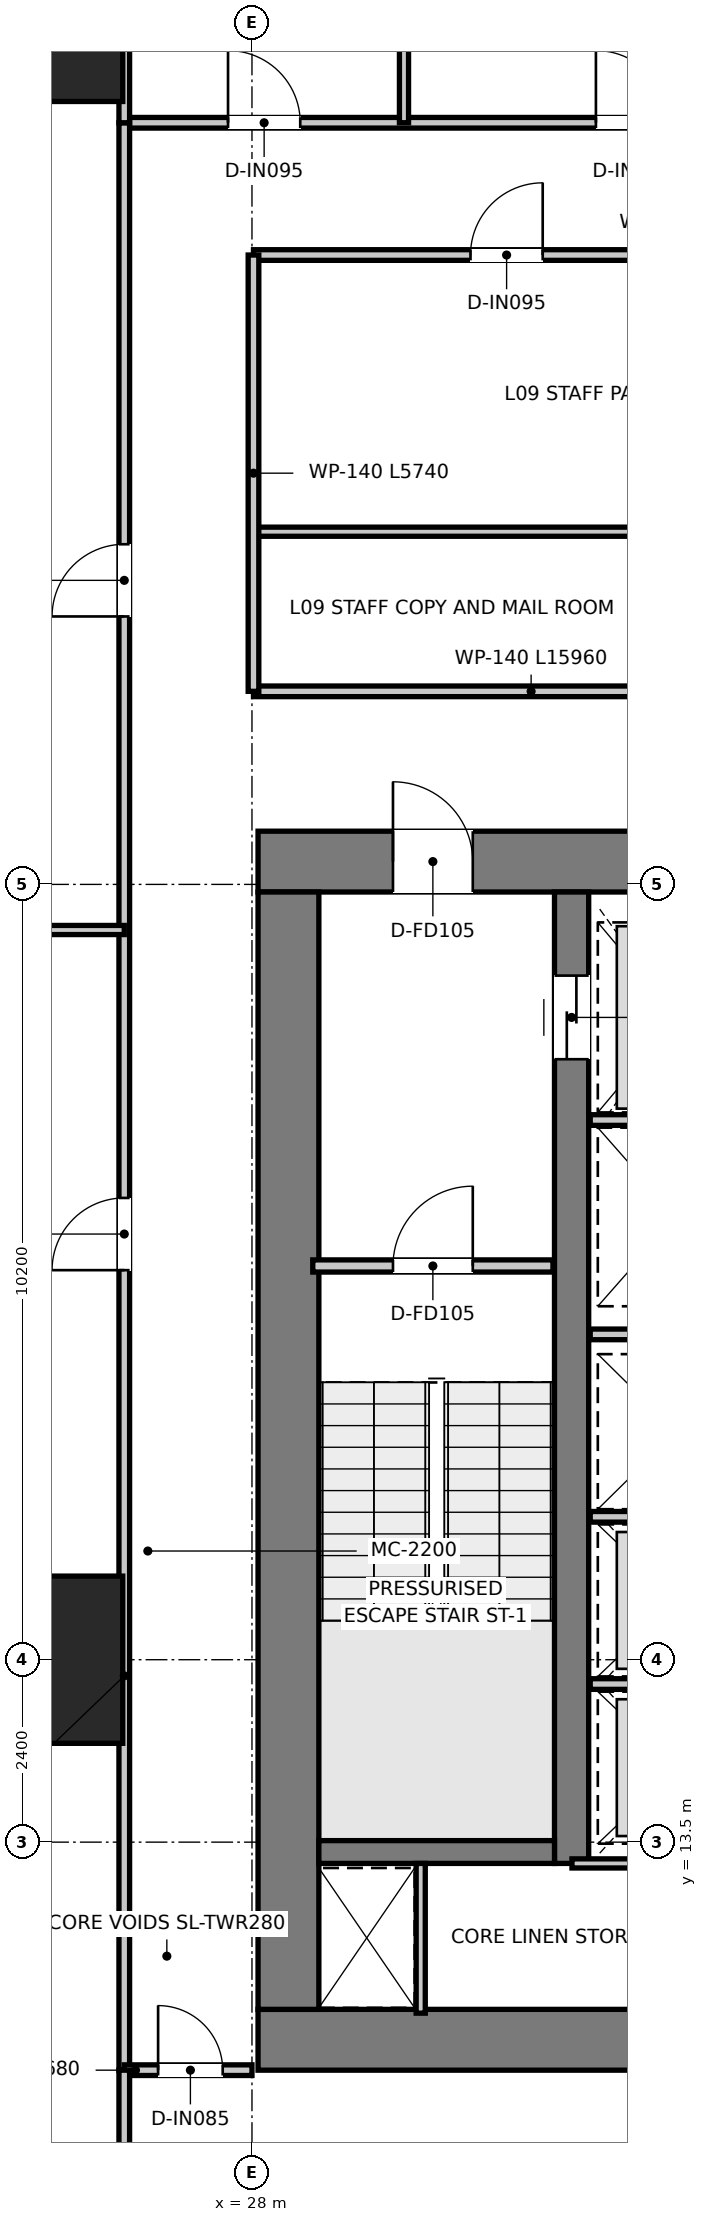
"""IFC4 building model, lengths in metres.
Left out: names, types, materials, properties, quantities, classifications, styles, units other than length and angle.
Written with IfcOpenShell. Run it as: python <this file> out.ifc"""

import sys

from ifc_helpers import new_model, si_unit, direction, frame, frame_2d, origin, origin_2d, place, context, subcontext, project, spatial, rectangle, extrude, source, transform, mapped, element, fill, save


model = new_model("IFC4")
c1 = context("Model", 3, precision=1e-05, world=origin(), true_north=direction((0.0, 1.0)))
c2 = subcontext(c1, "Body", "Model", "MODEL_VIEW")
j1 = project(units=[si_unit("LENGTHUNIT", "METRE"), si_unit("PLANEANGLEUNIT", "RADIAN")], contexts=[c1])
p1 = place(None, origin())
s1 = spatial("IfcSite", under=j1, at=p1, CompositionType="ELEMENT")
p2 = place(p1, origin())
s2 = spatial("IfcBuilding", under=s1, at=p2, CompositionType="ELEMENT")
p3 = place(p2, frame((0.0, 0.0, 40.8)))
s3 = spatial("IfcBuildingStorey", under=s2, at=p3, CompositionType="ELEMENT", Elevation=40.8)
p4 = place(p3, frame((28.08, 10.9, 0.0), z_axis=(0.0, 0.0, 1.0), x_axis=(1.0, 0.0, 0.0)))
e1 = element("IfcWall", 1, at=p4, inside=s3, PredefinedType="SHEAR", context=c2, shape_type="SweptSolid", body=[
    extrude(rectangle(XDim=15.84, YDim=0.8, at=frame_2d((7.92, 0.0))), origin(), (0.0, 0.0, 1.0), 3.95),
])
p5 = place(p3, frame((28.08, 26.4, 0.0), z_axis=(0.0, 0.0, 1.0), x_axis=(1.0, 0.0, 0.0)))
e2 = element("IfcWall", 2, at=p5, inside=s3, PredefinedType="SHEAR", context=c2, shape_type="SweptSolid", body=[
    extrude(rectangle(XDim=15.84, YDim=0.8, at=frame_2d((7.92, 0.0))), origin(), (0.0, 0.0, 1.0), 3.95),
])
p6 = place(p5, frame((7.22, 0.0, 0.0)))
e3 = element("IfcOpeningElement", 3, at=p6, cuts=e2, PredefinedType="OPENING", context=c2, shape_type="SweptSolid", body=[
    extrude(rectangle(XDim=1.4, YDim=2.2, at=frame_2d((0.7, 1.1))), frame((0.0, 0.41, 0.0), z_axis=(0.0, -1.0, 0.0), x_axis=(1.0, 0.0, 0.0)), (0.0, 0.0, 1.0), 0.82),
])
p7 = place(p5, frame((1.775, 0.0, 0.0)))
e4 = element("IfcOpeningElement", 4, at=p7, cuts=e2, PredefinedType="OPENING", context=c2, shape_type="SweptSolid", body=[
    extrude(rectangle(XDim=1.05, YDim=2.1, at=frame_2d((0.525, 1.05))), frame((0.0, 0.41, 0.0), z_axis=(0.0, -1.0, 0.0), x_axis=(1.0, 0.0, 0.0)), (0.0, 0.0, 1.0), 0.82),
])
p8 = place(p5, frame((13.015, 0.0, 0.0)))
e5 = element("IfcOpeningElement", 5, at=p8, cuts=e2, PredefinedType="OPENING", context=c2, shape_type="SweptSolid", body=[
    extrude(rectangle(XDim=1.05, YDim=2.1, at=frame_2d((0.525, 1.05))), frame((0.0, 0.41, 0.0), z_axis=(0.0, -1.0, 0.0), x_axis=(1.0, 0.0, 0.0)), (0.0, 0.0, 1.0), 0.82),
])
p9 = place(p3, frame((28.48, 11.3, 0.0), z_axis=(0.0, 0.0, 1.0), x_axis=(0.0, 1.0, 0.0)))
e6 = element("IfcWall", 6, at=p9, inside=s3, PredefinedType="SHEAR", context=c2, shape_type="SweptSolid", body=[
    extrude(rectangle(XDim=14.7, YDim=0.8, at=frame_2d((7.35, 0.0))), origin(), (0.0, 0.0, 1.0), 3.95),
])
p10 = place(p3, frame((32.205, 13.22, 0.0), z_axis=(0.0, 0.0, 1.0), x_axis=(0.0, 1.0, 0.0)))
e7 = element("IfcWall", 7, at=p10, inside=s3, PredefinedType="SHEAR", context=c2, shape_type="SweptSolid", body=[
    extrude(rectangle(XDim=12.78, YDim=0.45, at=frame_2d((6.39, 0.0))), origin(), (0.0, 0.0, 1.0), 3.95),
])
p11 = place(p10, frame((10.58, 0.0, 0.0)))
e8 = element("IfcOpeningElement", 8, at=p11, cuts=e7, PredefinedType="OPENING", context=c2, shape_type="SweptSolid", body=[
    extrude(rectangle(XDim=1.1, YDim=2.15, at=frame_2d((0.55, 1.075))), frame((0.0, 0.235, 0.0), z_axis=(0.0, -1.0, 0.0), x_axis=(1.0, 0.0, 0.0)), (0.0, 0.0, 1.0), 0.47),
])
p12 = place(p3, frame((28.88, 13.37, 0.0), z_axis=(0.0, 0.0, 1.0), x_axis=(1.0, 0.0, 0.0)))
e9 = element("IfcWall", 9, at=p12, inside=s3, PredefinedType="SHEAR", context=c2, shape_type="SweptSolid", body=[
    extrude(rectangle(XDim=3.1, YDim=0.3, at=frame_2d((1.55, 0.0))), origin(), (0.0, 0.0, 1.0), 3.95),
])
m1 = source(origin(), c2, "Body", "SweptSolid", [
    extrude(rectangle(XDim=2.2, YDim=2.2, at=origin_2d()), origin(), (0.0, 0.0, 1.0), 3.95),
])
for number, where, z_axis, x_axis in (
    (10, (25.2, 15.9, 0.0), (0.0, 0.0, 1.0), (1.0, 0.0, 0.0)),
    (11, (25.2, 37.5, 0.0), (0.0, 0.0, 1.0), (1.0, 0.0, 0.0)),
):
    element("IfcColumn", number, at=place(p3, frame(where, z_axis=z_axis, x_axis=x_axis)), inside=s3, PredefinedType="USERDEFINED", context=c2, shape_type="MappedRepresentation", body=[
        mapped(m1, transform((0.0, 0.0, 0.0), x_axis=(1.0, 0.0, 0.0), y_axis=(0.0, 1.0, 0.0), z_axis=(0.0, 0.0, 1.0), scale=1.0)),
    ])
p13 = place(p3, frame((28.8, 21.08, 0.0), z_axis=(0.0, 0.0, 1.0), x_axis=(1.0, 0.0, 0.0)))
e12 = element("IfcWall", 12, at=p13, inside=s3, PredefinedType="PARTITIONING", context=c2, shape_type="SweptSolid", body=[
    extrude(rectangle(XDim=3.16, YDim=0.16, at=frame_2d((1.58, 0.0))), origin(), (0.0, 0.0, 1.0), 3.67),
])
p14 = place(p13, frame((1.055, 0.0, 0.0)))
e13 = element("IfcOpeningElement", 13, at=p14, cuts=e12, PredefinedType="OPENING", context=c2, shape_type="SweptSolid", body=[
    extrude(rectangle(XDim=1.05, YDim=2.1, at=frame_2d((0.525, 1.05))), frame((0.0, 0.09, 0.0), z_axis=(0.0, -1.0, 0.0), x_axis=(1.0, 0.0, 0.0)), (0.0, 0.0, 1.0), 0.18),
])
p15 = place(p3, frame((32.45, 23.0, 0.0), z_axis=(0.0, 0.0, 1.0), x_axis=(1.0, 0.0, 0.0)))
e14 = element("IfcWall", 14, at=p15, inside=s3, PredefinedType="PARTITIONING", context=c2, shape_type="SweptSolid", body=[
    extrude(rectangle(XDim=2.27, YDim=0.14, at=frame_2d((1.135, 0.0))), origin(), (0.0, 0.0, 1.0), 2.47),
])
for number, where, z_axis, x_axis in (
    (15, (32.45, 17.78, 0.0), (0.0, 0.0, 1.0), (1.0, 0.0, 0.0)),
    (16, (32.45, 20.18, 0.0), (0.0, 0.0, 1.0), (1.0, 0.0, 0.0)),
    (17, (32.45, 15.58, 0.0), (0.0, 0.0, 1.0), (1.0, 0.0, 0.0)),
):
    element("IfcWall", number, at=place(p3, frame(where, z_axis=z_axis, x_axis=x_axis)), inside=s3, PredefinedType="PARTITIONING", context=c2, shape_type="SweptSolid", body=[
        extrude(rectangle(XDim=2.27, YDim=0.14, at=frame_2d((1.135, 0.0))), origin(), (0.0, 0.0, 1.0), 3.67),
    ])
p16 = place(p3, frame((30.22, 11.25, 0.0), z_axis=(0.0, 0.0, 1.0), x_axis=(0.0, 1.0, 0.0)))
e18 = element("IfcWall", 18, at=p16, inside=s3, PredefinedType="PARTITIONING", context=c2, shape_type="SweptSolid", body=[
    extrude(rectangle(XDim=1.97, YDim=0.12, at=frame_2d((0.985, 0.0))), origin(), (0.0, 0.0, 1.0), 3.67),
])
p17 = place(p3, frame((32.21, 13.22, 0.0), z_axis=(0.0, 0.0, 1.0), x_axis=(1.0, 0.0, 0.0)))
e19 = element("IfcWall", 19, at=p17, inside=s3, PredefinedType="PARTITIONING", context=c2, shape_type="SweptSolid", body=[
    extrude(rectangle(XDim=7.58, YDim=0.12, at=frame_2d((3.79, 0.0))), origin(), (0.0, 0.0, 1.0), 3.67),
])
p18 = place(p17, frame((3.365, 0.0, 0.0)))
e20 = element("IfcOpeningElement", 20, at=p18, cuts=e19, PredefinedType="OPENING", context=c2, shape_type="SweptSolid", body=[
    extrude(rectangle(XDim=0.85, YDim=2.1, at=frame_2d((0.425, 1.05))), frame((0.0, 0.07, 0.0), z_axis=(0.0, -1.0, 0.0), x_axis=(1.0, 0.0, 0.0)), (0.0, 0.0, 1.0), 0.14),
])
p19 = place(p3, frame((28.02, 28.64, 0.0), z_axis=(0.0, 0.0, 1.0), x_axis=(1.0, 0.0, 0.0)))
e21 = element("IfcWall", 21, at=p19, inside=s3, PredefinedType="PARTITIONING", context=c2, shape_type="SweptSolid", body=[
    extrude(rectangle(XDim=15.96, YDim=0.14, at=frame_2d((7.98, 0.0))), origin(), (0.0, 0.0, 1.0), 3.08),
])
p20 = place(p19, frame((7.455, 0.0, 0.0)))
e22 = element("IfcOpeningElement", 22, at=p20, cuts=e21, PredefinedType="OPENING", context=c2, shape_type="SweptSolid", body=[
    extrude(rectangle(XDim=1.05, YDim=2.15, at=frame_2d((0.525, 1.075))), frame((0.0, 0.08, 0.0), z_axis=(0.0, -1.0, 0.0), x_axis=(1.0, 0.0, 0.0)), (0.0, 0.0, 1.0), 0.16),
])
p21 = place(p3, frame((28.02, 30.74, 0.0), z_axis=(0.0, 0.0, 1.0), x_axis=(1.0, 0.0, 0.0)))
e23 = element("IfcWall", 23, at=p21, inside=s3, PredefinedType="PARTITIONING", context=c2, shape_type="SweptSolid", body=[
    extrude(rectangle(XDim=15.96, YDim=0.12, at=frame_2d((7.98, 0.0))), origin(), (0.0, 0.0, 1.0), 3.08),
])
p22 = place(p3, frame((28.02, 34.38, 0.0), z_axis=(0.0, 0.0, 1.0), x_axis=(1.0, 0.0, 0.0)))
e24 = element("IfcWall", 24, at=p22, inside=s3, PredefinedType="PARTITIONING", context=c2, shape_type="SweptSolid", body=[
    extrude(rectangle(XDim=15.96, YDim=0.14, at=frame_2d((7.98, 0.0))), origin(), (0.0, 0.0, 1.0), 3.08),
])
p23 = place(p22, frame((7.83, 0.0, 0.0)))
e25 = element("IfcOpeningElement", 25, at=p23, cuts=e24, PredefinedType="OPENING", context=c2, shape_type="SweptSolid", body=[
    extrude(rectangle(XDim=0.9, YDim=2.1, at=frame_2d((0.45, 1.05))), frame((0.0, 0.08, 0.0), z_axis=(0.0, -1.0, 0.0), x_axis=(1.0, 0.0, 0.0)), (0.0, 0.0, 1.0), 0.16),
])
p24 = place(p22, frame((11.03, 0.0, 0.0)))
e26 = element("IfcOpeningElement", 26, at=p24, cuts=e24, PredefinedType="OPENING", context=c2, shape_type="SweptSolid", body=[
    extrude(rectangle(XDim=0.9, YDim=2.1, at=frame_2d((0.45, 1.05))), frame((0.0, 0.08, 0.0), z_axis=(0.0, -1.0, 0.0), x_axis=(1.0, 0.0, 0.0)), (0.0, 0.0, 1.0), 0.16),
])
p25 = place(p22, frame((14.055, 0.0, 0.0)))
e27 = element("IfcOpeningElement", 27, at=p25, cuts=e24, PredefinedType="OPENING", context=c2, shape_type="SweptSolid", body=[
    extrude(rectangle(XDim=0.95, YDim=2.1, at=frame_2d((0.475, 1.05))), frame((0.0, 0.08, 0.0), z_axis=(0.0, -1.0, 0.0), x_axis=(1.0, 0.0, 0.0)), (0.0, 0.0, 1.0), 0.16),
])
p26 = place(p22, frame((2.855, 0.0, 0.0)))
e28 = element("IfcOpeningElement", 28, at=p26, cuts=e24, PredefinedType="OPENING", context=c2, shape_type="SweptSolid", body=[
    extrude(rectangle(XDim=0.95, YDim=2.1, at=frame_2d((0.475, 1.05))), frame((0.0, 0.08, 0.0), z_axis=(0.0, -1.0, 0.0), x_axis=(1.0, 0.0, 0.0)), (0.0, 0.0, 1.0), 0.16),
])
p27 = place(p3, frame((28.02, 28.64, 0.0), z_axis=(0.0, 0.0, 1.0), x_axis=(0.0, 1.0, 0.0)))
e29 = element("IfcWall", 29, at=p27, inside=s3, PredefinedType="PARTITIONING", context=c2, shape_type="SweptSolid", body=[
    extrude(rectangle(XDim=5.74, YDim=0.14, at=frame_2d((2.87, 0.0))), origin(), (0.0, 0.0, 1.0), 3.22),
])
p28 = place(p3, frame((26.32, 36.12, 0.0), z_axis=(0.0, 0.0, 1.0), x_axis=(1.0, 0.0, 0.0)))
e30 = element("IfcWall", 30, at=p28, inside=s3, PredefinedType="PARTITIONING", context=c2, shape_type="SweptSolid", body=[
    extrude(rectangle(XDim=19.36, YDim=0.14, at=frame_2d((9.68, 0.0))), origin(), (0.0, 0.0, 1.0), 3.08),
])
p29 = place(p28, frame((1.365, 0.0, 0.0)))
e31 = element("IfcOpeningElement", 31, at=p29, cuts=e30, PredefinedType="OPENING", context=c2, shape_type="SweptSolid", body=[
    extrude(rectangle(XDim=0.95, YDim=2.1, at=frame_2d((0.475, 1.05))), frame((0.0, 0.08, 0.0), z_axis=(0.0, -1.0, 0.0), x_axis=(1.0, 0.0, 0.0)), (0.0, 0.0, 1.0), 0.16),
])
p30 = place(p28, frame((6.205, 0.0, 0.0)))
e32 = element("IfcOpeningElement", 32, at=p30, cuts=e30, PredefinedType="OPENING", context=c2, shape_type="SweptSolid", body=[
    extrude(rectangle(XDim=0.95, YDim=2.1, at=frame_2d((0.475, 1.05))), frame((0.0, 0.08, 0.0), z_axis=(0.0, -1.0, 0.0), x_axis=(1.0, 0.0, 0.0)), (0.0, 0.0, 1.0), 0.16),
])
p31 = place(p28, frame((12.205, 0.0, 0.0)))
e33 = element("IfcOpeningElement", 33, at=p31, cuts=e30, PredefinedType="OPENING", context=c2, shape_type="SweptSolid", body=[
    extrude(rectangle(XDim=0.95, YDim=2.1, at=frame_2d((0.475, 1.05))), frame((0.0, 0.08, 0.0), z_axis=(0.0, -1.0, 0.0), x_axis=(1.0, 0.0, 0.0)), (0.0, 0.0, 1.0), 0.16),
])
p32 = place(p28, frame((17.045, 0.0, 0.0)))
e34 = element("IfcOpeningElement", 34, at=p32, cuts=e30, PredefinedType="OPENING", context=c2, shape_type="SweptSolid", body=[
    extrude(rectangle(XDim=0.95, YDim=2.1, at=frame_2d((0.475, 1.05))), frame((0.0, 0.08, 0.0), z_axis=(0.0, -1.0, 0.0), x_axis=(1.0, 0.0, 0.0)), (0.0, 0.0, 1.0), 0.16),
])
p33 = place(p3, frame((26.32, 10.5, 0.0), z_axis=(0.0, 0.0, 1.0), x_axis=(0.0, 1.0, 0.0)))
e35 = element("IfcWall", 35, at=p33, inside=s3, PredefinedType="PARTITIONING", context=c2, shape_type="SweptSolid", body=[
    extrude(rectangle(XDim=25.62, YDim=0.14, at=frame_2d((12.81, 0.0))), origin(), (0.0, 0.0, 1.0), 2.97),
])
p34 = place(p33, frame((10.525, 0.0, 0.0)))
e36 = element("IfcOpeningElement", 36, at=p34, cuts=e35, PredefinedType="OPENING", context=c2, shape_type="SweptSolid", body=[
    extrude(rectangle(XDim=0.95, YDim=2.1, at=frame_2d((0.475, 1.05))), frame((0.0, 0.08, 0.0), z_axis=(0.0, -1.0, 0.0), x_axis=(1.0, 0.0, 0.0)), (0.0, 0.0, 1.0), 0.16),
])
p35 = place(p33, frame((19.125, 0.0, 0.0)))
e37 = element("IfcOpeningElement", 37, at=p35, cuts=e35, PredefinedType="OPENING", context=c2, shape_type="SweptSolid", body=[
    extrude(rectangle(XDim=0.95, YDim=2.1, at=frame_2d((0.475, 1.05))), frame((0.0, 0.08, 0.0), z_axis=(0.0, -1.0, 0.0), x_axis=(1.0, 0.0, 0.0)), (0.0, 0.0, 1.0), 0.16),
])
p36 = place(p3, frame((26.32, 10.5, 0.0), z_axis=(0.0, 0.0, 1.0), x_axis=(1.0, 0.0, 0.0)))
e38 = element("IfcWall", 38, at=p36, inside=s3, PredefinedType="PARTITIONING", context=c2, shape_type="SweptSolid", body=[
    extrude(rectangle(XDim=1.68, YDim=0.14, at=frame_2d((0.84, 0.0))), origin(), (0.0, 0.0, 1.0), 3.67),
])
p37 = place(p36, frame((0.445, 0.0, 0.0)))
e39 = element("IfcOpeningElement", 39, at=p37, cuts=e38, PredefinedType="OPENING", context=c2, shape_type="SweptSolid", body=[
    extrude(rectangle(XDim=0.85, YDim=2.1, at=frame_2d((0.425, 1.05))), frame((0.0, 0.08, 0.0), z_axis=(0.0, -1.0, 0.0), x_axis=(1.0, 0.0, 0.0)), (0.0, 0.0, 1.0), 0.16),
])
p38 = place(p3, frame((26.32, 36.12, 0.0), z_axis=(0.0, 0.0, 1.0), x_axis=(0.0, 1.0, 0.0)))
e40 = element("IfcWall", 40, at=p38, inside=s3, PredefinedType="PARTITIONING", context=c2, shape_type="SweptSolid", body=[
    extrude(rectangle(XDim=15.866, YDim=0.14, at=frame_2d((7.933, 0.0))), origin(), (0.0, 0.0, 1.0), 2.97),
])
p39 = place(p3, frame((26.32, 2.132, 0.0), z_axis=(0.0, 0.0, 1.0), x_axis=(0.0, 1.0, 0.0)))
e41 = element("IfcWall", 41, at=p39, inside=s3, PredefinedType="PARTITIONING", context=c2, shape_type="SweptSolid", body=[
    extrude(rectangle(XDim=8.368, YDim=0.14, at=frame_2d((4.184, 0.0))), origin(), (0.0, 0.0, 1.0), 3.67),
])
p40 = place(p3, frame((30.0, 36.12, 0.0), z_axis=(0.0, 0.0, 1.0), x_axis=(0.0, 1.0, 0.0)))
e42 = element("IfcWall", 42, at=p40, inside=s3, PredefinedType="PARTITIONING", context=c2, shape_type="SweptSolid", body=[
    extrude(rectangle(XDim=15.73, YDim=0.12, at=frame_2d((7.865, 0.0))), origin(), (0.0, 0.0, 1.0), 2.97),
])
p41 = place(p3, frame((11.028, 25.5, 0.0), z_axis=(0.0, 0.0, 1.0), x_axis=(1.0, 0.0, 0.0)))
e43 = element("IfcWall", 43, at=p41, inside=s3, PredefinedType="PARTITIONING", context=c2, shape_type="SweptSolid", body=[
    extrude(rectangle(XDim=15.292, YDim=0.12, at=frame_2d((7.646, 0.0))), origin(), (0.0, 0.0, 1.0), 2.97),
])
p42 = place(p14, origin())
e44 = element("IfcDoor", 44, at=p42, inside=s3, OperationType="SINGLE_SWING_RIGHT", PredefinedType="DOOR", context=c2, shape_type="SweptSolid", body=[
    extrude(rectangle(XDim=1.05, YDim=2.1, at=frame_2d((0.525, 1.05))), frame((0.0, 0.025, 0.0), z_axis=(0.0, -1.0, 0.0), x_axis=(1.0, 0.0, 0.0)), (0.0, 0.0, 1.0), 0.05),
])
fill(e13, e44)
p43 = place(p7, origin())
e45 = element("IfcDoor", 45, at=p43, inside=s3, OperationType="SINGLE_SWING_LEFT", PredefinedType="DOOR", context=c2, shape_type="SweptSolid", body=[
    extrude(rectangle(XDim=1.05, YDim=2.1, at=frame_2d((0.525, 1.05))), frame((0.0, 0.025, 0.0), z_axis=(0.0, -1.0, 0.0), x_axis=(1.0, 0.0, 0.0)), (0.0, 0.0, 1.0), 0.05),
])
fill(e4, e45)
p44 = place(p11, origin())
e46 = element("IfcDoor", 46, at=p44, inside=s3, OperationType="DOUBLE_DOOR_SLIDING", PredefinedType="DOOR", context=c2, shape_type="SweptSolid", body=[
    extrude(rectangle(XDim=1.1, YDim=2.15, at=frame_2d((0.55, 1.075))), frame((0.0, 0.025, 0.0), z_axis=(0.0, -1.0, 0.0), x_axis=(1.0, 0.0, 0.0)), (0.0, 0.0, 1.0), 0.05),
])
fill(e8, e46)
p45 = place(p26, origin())
e47 = element("IfcDoor", 47, at=p45, inside=s3, OperationType="SINGLE_SWING_RIGHT", PredefinedType="DOOR", context=c2, shape_type="SweptSolid", body=[
    extrude(rectangle(XDim=0.95, YDim=2.1, at=frame_2d((0.475, 1.05))), frame((0.0, 0.025, 0.0), z_axis=(0.0, -1.0, 0.0), x_axis=(1.0, 0.0, 0.0)), (0.0, 0.0, 1.0), 0.05),
])
fill(e28, e47)
p46 = place(p29, origin())
e48 = element("IfcDoor", 48, at=p46, inside=s3, OperationType="SINGLE_SWING_LEFT", PredefinedType="DOOR", context=c2, shape_type="SweptSolid", body=[
    extrude(rectangle(XDim=0.95, YDim=2.1, at=frame_2d((0.475, 1.05))), frame((0.0, 0.025, 0.0), z_axis=(0.0, -1.0, 0.0), x_axis=(1.0, 0.0, 0.0)), (0.0, 0.0, 1.0), 0.05),
])
fill(e31, e48)
p47 = place(p30, origin())
e49 = element("IfcDoor", 49, at=p47, inside=s3, OperationType="SINGLE_SWING_LEFT", PredefinedType="DOOR", context=c2, shape_type="SweptSolid", body=[
    extrude(rectangle(XDim=0.95, YDim=2.1, at=frame_2d((0.475, 1.05))), frame((0.0, 0.025, 0.0), z_axis=(0.0, -1.0, 0.0), x_axis=(1.0, 0.0, 0.0)), (0.0, 0.0, 1.0), 0.05),
])
fill(e32, e49)
p48 = place(p34, origin())
e50 = element("IfcDoor", 50, at=p48, inside=s3, OperationType="SINGLE_SWING_LEFT", PredefinedType="DOOR", context=c2, shape_type="SweptSolid", body=[
    extrude(rectangle(XDim=0.95, YDim=2.1, at=frame_2d((0.475, 1.05))), frame((0.0, 0.025, 0.0), z_axis=(0.0, -1.0, 0.0), x_axis=(1.0, 0.0, 0.0)), (0.0, 0.0, 1.0), 0.05),
])
fill(e36, e50)
p49 = place(p35, origin())
e51 = element("IfcDoor", 51, at=p49, inside=s3, OperationType="SINGLE_SWING_LEFT", PredefinedType="DOOR", context=c2, shape_type="SweptSolid", body=[
    extrude(rectangle(XDim=0.95, YDim=2.1, at=frame_2d((0.475, 1.05))), frame((0.0, 0.025, 0.0), z_axis=(0.0, -1.0, 0.0), x_axis=(1.0, 0.0, 0.0)), (0.0, 0.0, 1.0), 0.05),
])
fill(e37, e51)
p50 = place(p37, origin())
e52 = element("IfcDoor", 52, at=p50, inside=s3, OperationType="SINGLE_SWING_LEFT", PredefinedType="DOOR", context=c2, shape_type="SweptSolid", body=[
    extrude(rectangle(XDim=0.85, YDim=2.1, at=frame_2d((0.425, 1.05))), frame((0.0, 0.025, 0.0), z_axis=(0.0, -1.0, 0.0), x_axis=(1.0, 0.0, 0.0)), (0.0, 0.0, 1.0), 0.05),
])
fill(e39, e52)
save(model, sys.argv[1])
